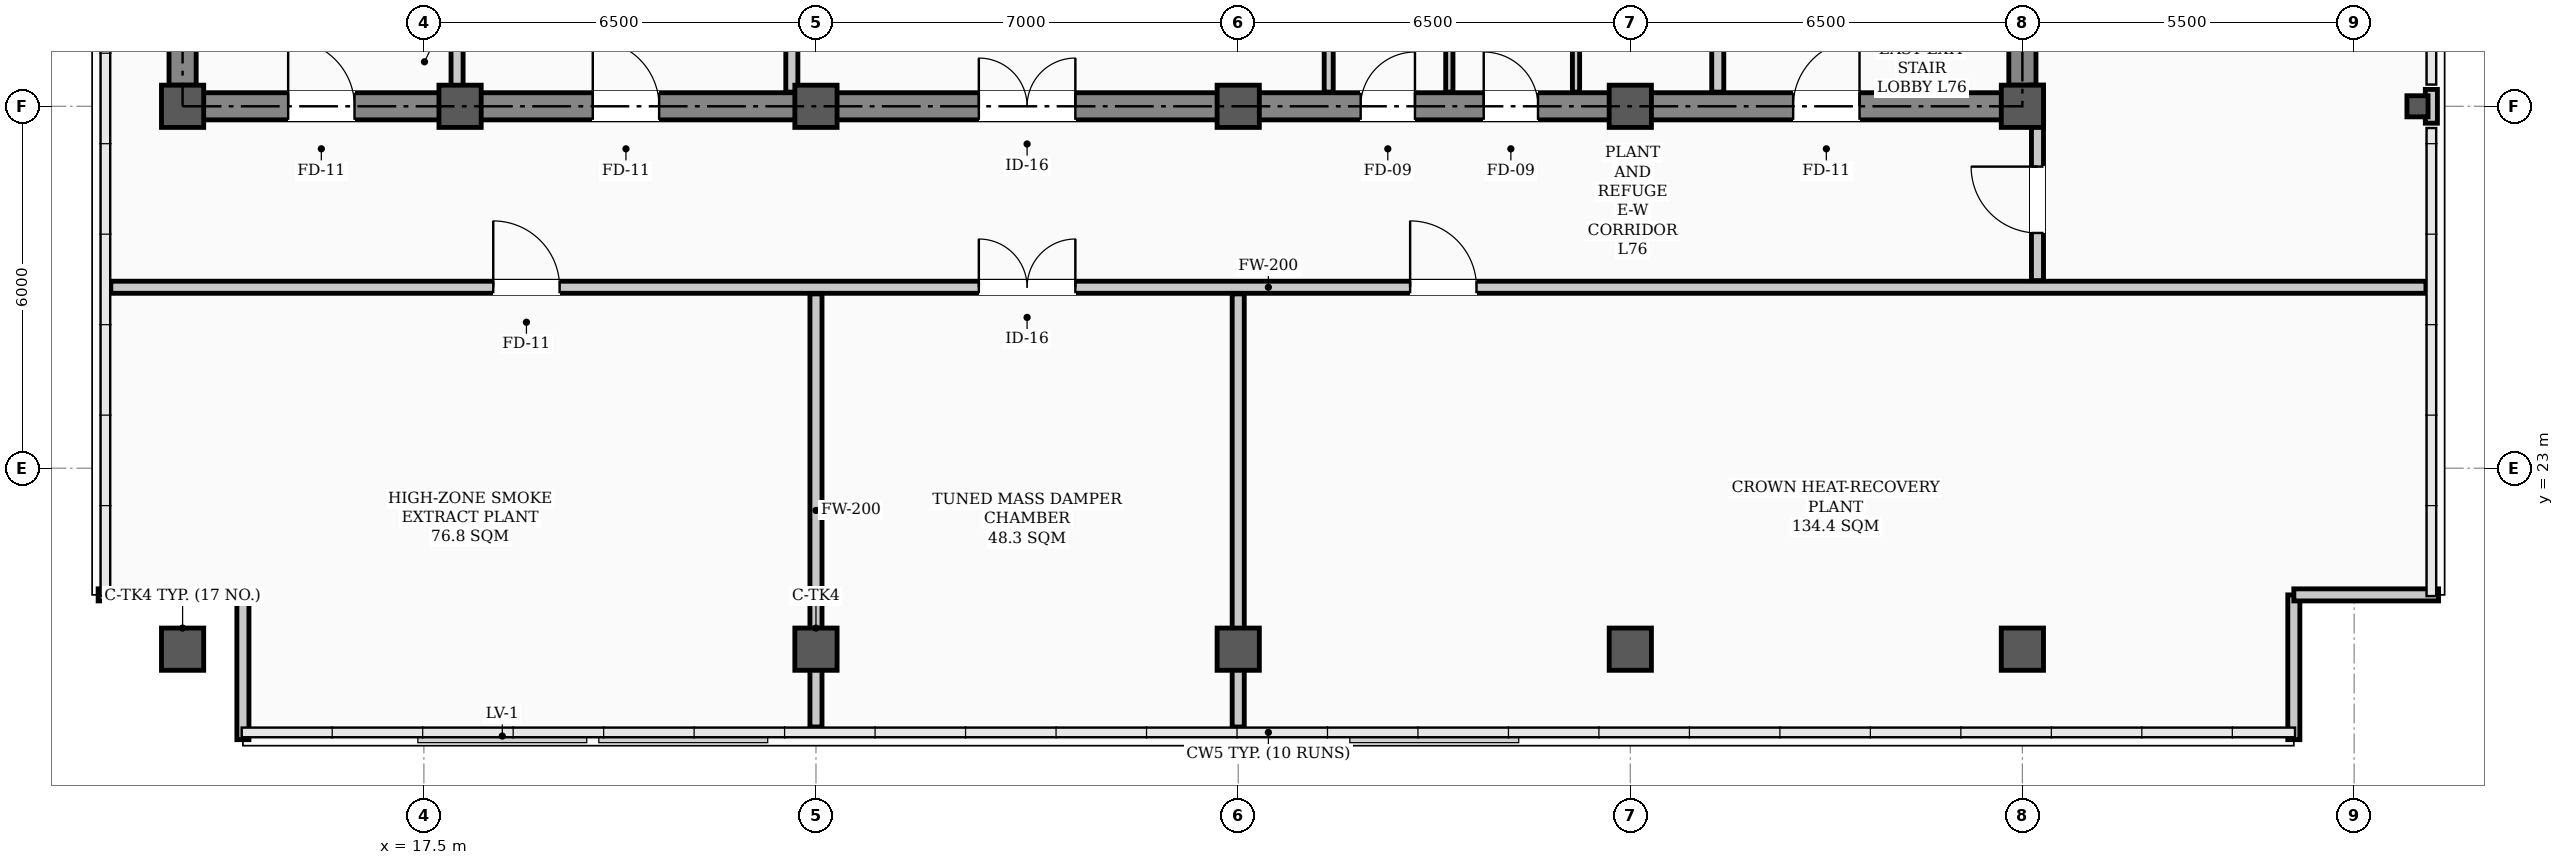
"""IFC4 building model, lengths in metres.
Left out: names, types, materials, properties, quantities, classifications, styles, units other than length and angle.
Written with IfcOpenShell. Run it as: python <this file> out.ifc"""

import sys

from ifc_helpers import new_model, si_unit, direction, frame, frame_2d, origin, origin_2d, place, context, subcontext, project, spatial, rectangle, hollow_rectangle, extrude, element, fill, save


model = new_model("IFC4")
c1 = context("Model", 3, precision=1e-05, world=origin(), true_north=direction((0.0, 1.0)))
c2 = subcontext(c1, "Body", "Model", "MODEL_VIEW")
j1 = project(units=[si_unit("LENGTHUNIT", "METRE"), si_unit("PLANEANGLEUNIT", "RADIAN")], contexts=[c1])
p1 = place(None, origin())
s1 = spatial("IfcSite", under=j1, at=p1, CompositionType="ELEMENT")
p2 = place(p1, origin())
s2 = spatial("IfcBuilding", under=s1, at=p2, CompositionType="ELEMENT")
p3 = place(p2, frame((0.0, 0.0, 306.0)))
s3 = spatial("IfcBuildingStorey", under=s2, at=p3, CompositionType="ELEMENT", Elevation=306.0)
for number, where, z_axis, x_axis in (
    (1, (13.5, 29.0, 0.0), (0.0, 0.0, 1.0), (1.0, 0.0, 0.0)),
    (2, (18.1, 29.0, 0.0), (0.0, 0.0, 1.0), (1.0, 0.0, 0.0)),
    (3, (24.0, 29.0, 0.0), (0.0, 0.0, 1.0), (1.0, 0.0, 0.0)),
    (4, (31.0, 29.0, 0.0), (0.0, 0.0, 1.0), (1.0, 0.0, 0.0)),
    (5, (37.5, 29.0, 0.0), (0.0, 0.0, 1.0), (1.0, 0.0, 0.0)),
    (6, (44.0, 29.0, 0.0), (0.0, 0.0, 1.0), (1.0, 0.0, 0.0)),
    (7, (13.5, 20.0, 0.0), (0.0, 0.0, 1.0), (1.0, 0.0, 0.0)),
    (8, (24.0, 20.0, 0.0), (0.0, 0.0, 1.0), (1.0, 0.0, 0.0)),
    (9, (31.0, 20.0, 0.0), (0.0, 0.0, 1.0), (1.0, 0.0, 0.0)),
    (10, (37.5, 20.0, 0.0), (0.0, 0.0, 1.0), (1.0, 0.0, 0.0)),
    (11, (44.0, 20.0, 0.0), (0.0, 0.0, 1.0), (1.0, 0.0, 0.0)),
):
    element("IfcColumn", number, at=place(p3, frame(where, z_axis=z_axis, x_axis=x_axis)), inside=s3, PredefinedType="COLUMN", context=c2, shape_type="SweptSolid", body=[
        extrude(hollow_rectangle(XDim=0.7, YDim=0.7, WallThickness=0.028, InnerFilletRadius=0.014, OuterFilletRadius=0.042, at=origin_2d()), origin(), (0.0, 0.0, 1.0), 6.6),
    ])
p4 = place(p3, frame((50.55, 29.0, 0.0), z_axis=(0.0, 0.0, 1.0), x_axis=(1.0, 0.0, 0.0)))
e12 = element("IfcColumn", 12, at=p4, inside=s3, PredefinedType="COLUMN", context=c2, shape_type="SweptSolid", body=[
    extrude(hollow_rectangle(XDim=0.35, YDim=0.35, WallThickness=0.016, InnerFilletRadius=0.016, OuterFilletRadius=0.032, at=origin_2d()), origin(), (0.0, 0.0, 1.0), 6.6),
])
p5 = place(p3, frame((50.78, 28.72, 0.0), z_axis=(0.0, 0.0, 1.0), x_axis=(0.0, 1.0, 0.0)))
e13 = element("IfcWall", 13, at=p5, inside=s3, PredefinedType="PARAPET", context=c2, shape_type="SweptSolid", body=[
    extrude(rectangle(XDim=0.56, YDim=0.2, at=frame_2d((0.28, 0.0))), origin(), (0.0, 0.0, 1.0), 1.2),
])
for number, where, z_axis, x_axis in (
    (14, (12.1, 20.9, 0.0), (0.0, 0.0, 1.0), (1.0, 0.0, 0.0)),
    (15, (14.5, 20.9, 0.0), (0.0, 0.0, 1.0), (0.0, -1.0, 0.0)),
    (16, (48.5, 18.5, 0.0), (0.0, 0.0, 1.0), (0.0, 1.0, 0.0)),
    (17, (48.5, 20.9, 0.0), (0.0, 0.0, 1.0), (1.0, 0.0, 0.0)),
):
    element("IfcWall", number, at=place(p3, frame(where, z_axis=z_axis, x_axis=x_axis)), inside=s3, PredefinedType="PARAPET", context=c2, shape_type="SweptSolid", body=[
        extrude(rectangle(XDim=2.4, YDim=0.2, at=frame_2d((1.2, 0.0))), origin(), (0.0, 0.0, 1.0), 1.2),
    ])
p6 = place(p3, frame((13.5, 29.0, 0.0), z_axis=(0.0, 0.0, 1.0), x_axis=(1.0, 0.0, 0.0)))
e18 = element("IfcWall", 18, at=p6, inside=s3, PredefinedType="SHEAR", context=c2, shape_type="SweptSolid", body=[
    extrude(rectangle(XDim=30.5, YDim=0.45, at=frame_2d((15.25, 0.0))), origin(), (0.0, 0.0, 1.0), 6.34),
])
p7 = place(p6, frame((1.75, 0.0, 0.0)))
e19 = element("IfcOpeningElement", 19, at=p7, cuts=e18, PredefinedType="OPENING", context=c2, shape_type="SweptSolid", body=[
    extrude(rectangle(XDim=1.1, YDim=2.08, at=frame_2d((0.55, 1.04))), frame((0.0, 0.235, 0.0), z_axis=(0.0, -1.0, 0.0), x_axis=(1.0, 0.0, 0.0)), (0.0, 0.0, 1.0), 0.47),
])
p8 = place(p6, frame((26.7, 0.0, 0.0)))
e20 = element("IfcOpeningElement", 20, at=p8, cuts=e18, PredefinedType="OPENING", context=c2, shape_type="SweptSolid", body=[
    extrude(rectangle(XDim=1.1, YDim=2.08, at=frame_2d((0.55, 1.04))), frame((0.0, 0.235, 0.0), z_axis=(0.0, -1.0, 0.0), x_axis=(1.0, 0.0, 0.0)), (0.0, 0.0, 1.0), 0.47),
])
p9 = place(p6, frame((6.8, 0.0, 0.0)))
e21 = element("IfcOpeningElement", 21, at=p9, cuts=e18, PredefinedType="OPENING", context=c2, shape_type="SweptSolid", body=[
    extrude(rectangle(XDim=1.1, YDim=2.08, at=frame_2d((0.55, 1.04))), frame((0.0, 0.235, 0.0), z_axis=(0.0, -1.0, 0.0), x_axis=(1.0, 0.0, 0.0)), (0.0, 0.0, 1.0), 0.47),
])
p10 = place(p6, frame((13.2, 0.0, 0.0)))
e22 = element("IfcOpeningElement", 22, at=p10, cuts=e18, PredefinedType="OPENING", context=c2, shape_type="SweptSolid", body=[
    extrude(rectangle(XDim=1.6, YDim=2.08, at=frame_2d((0.8, 1.04))), frame((0.0, 0.235, 0.0), z_axis=(0.0, -1.0, 0.0), x_axis=(1.0, 0.0, 0.0)), (0.0, 0.0, 1.0), 0.47),
])
p11 = place(p6, frame((19.53, 0.0, 0.0)))
e23 = element("IfcOpeningElement", 23, at=p11, cuts=e18, PredefinedType="OPENING", context=c2, shape_type="SweptSolid", body=[
    extrude(rectangle(XDim=0.9, YDim=2.08, at=frame_2d((0.45, 1.04))), frame((0.0, 0.235, 0.0), z_axis=(0.0, -1.0, 0.0), x_axis=(1.0, 0.0, 0.0)), (0.0, 0.0, 1.0), 0.47),
])
p12 = place(p6, frame((21.57, 0.0, 0.0)))
e24 = element("IfcOpeningElement", 24, at=p12, cuts=e18, PredefinedType="OPENING", context=c2, shape_type="SweptSolid", body=[
    extrude(rectangle(XDim=0.9, YDim=2.08, at=frame_2d((0.45, 1.04))), frame((0.0, 0.235, 0.0), z_axis=(0.0, -1.0, 0.0), x_axis=(1.0, 0.0, 0.0)), (0.0, 0.0, 1.0), 0.47),
])
for number, where, z_axis, x_axis in (
    (25, (13.5, 29.35, 0.0), (0.0, 0.0, 1.0), (0.0, 1.0, 0.0)),
    (26, (44.0, 29.35, 0.0), (0.0, 0.0, 1.0), (0.0, 1.0, 0.0)),
):
    element("IfcWall", number, at=place(p3, frame(where, z_axis=z_axis, x_axis=x_axis)), inside=s3, PredefinedType="SHEAR", context=c2, shape_type="SweptSolid", body=[
        extrude(rectangle(XDim=8.6, YDim=0.45, at=frame_2d((4.3, 0.0))), origin(), (0.0, 0.0, 1.0), 6.34),
    ])
p13 = place(p3, frame((12.31, 26.0, 0.0), z_axis=(0.0, 0.0, 1.0), x_axis=(1.0, 0.0, 0.0)))
e27 = element("IfcWall", 27, at=p13, inside=s3, PredefinedType="STANDARD", context=c2, shape_type="SweptSolid", body=[
    extrude(rectangle(XDim=38.38, YDim=0.2, at=frame_2d((19.19, 0.0))), origin(), (0.0, 0.0, 1.0), 2.43),
])
p14 = place(p13, frame((6.34, 0.0, 0.0)))
e28 = element("IfcOpeningElement", 28, at=p14, cuts=e27, PredefinedType="OPENING", context=c2, shape_type="SweptSolid", body=[
    extrude(rectangle(XDim=1.1, YDim=2.08, at=frame_2d((0.55, 1.04))), frame((0.0, 0.11, 0.0), z_axis=(0.0, -1.0, 0.0), x_axis=(1.0, 0.0, 0.0)), (0.0, 0.0, 1.0), 0.22),
])
p15 = place(p13, frame((14.39, 0.0, 0.0)))
e29 = element("IfcOpeningElement", 29, at=p15, cuts=e27, PredefinedType="OPENING", context=c2, shape_type="SweptSolid", body=[
    extrude(rectangle(XDim=1.6, YDim=2.08, at=frame_2d((0.8, 1.04))), frame((0.0, 0.11, 0.0), z_axis=(0.0, -1.0, 0.0), x_axis=(1.0, 0.0, 0.0)), (0.0, 0.0, 1.0), 0.22),
])
p16 = place(p13, frame((21.54, 0.0, 0.0)))
e30 = element("IfcOpeningElement", 30, at=p16, cuts=e27, PredefinedType="OPENING", context=c2, shape_type="SweptSolid", body=[
    extrude(rectangle(XDim=1.1, YDim=2.08, at=frame_2d((0.55, 1.04))), frame((0.0, 0.11, 0.0), z_axis=(0.0, -1.0, 0.0), x_axis=(1.0, 0.0, 0.0)), (0.0, 0.0, 1.0), 0.22),
])
p17 = place(p3, frame((18.05, 29.235, 0.0), z_axis=(0.0, 0.0, 1.0), x_axis=(0.0, 1.0, 0.0)))
e31 = element("IfcWall", 31, at=p17, inside=s3, PredefinedType="STANDARD", context=c2, shape_type="SweptSolid", body=[
    extrude(rectangle(XDim=1.065, YDim=0.2, at=frame_2d((0.532, 0.0))), origin(), (0.0, 0.0, 1.0), 6.34),
])
p18 = place(p3, frame((38.95, 29.235, 0.0), z_axis=(0.0, 0.0, 1.0), x_axis=(0.0, 1.0, 0.0)))
e32 = element("IfcWall", 32, at=p18, inside=s3, PredefinedType="STANDARD", context=c2, shape_type="SweptSolid", body=[
    extrude(rectangle(XDim=1.065, YDim=0.2, at=frame_2d((0.532, 0.0))), origin(), (0.0, 0.0, 1.0), 6.02),
])
p19 = place(p3, frame((23.6, 29.235, 0.0), z_axis=(0.0, 0.0, 1.0), x_axis=(0.0, 1.0, 0.0)))
e33 = element("IfcWall", 33, at=p19, inside=s3, PredefinedType="STANDARD", context=c2, shape_type="SweptSolid", body=[
    extrude(rectangle(XDim=5.465, YDim=0.2, at=frame_2d((2.732, 0.0))), origin(), (0.0, 0.0, 1.0), 2.43),
])
p20 = place(p3, frame((32.5, 29.235, 0.0), z_axis=(0.0, 0.0, 1.0), x_axis=(0.0, 1.0, 0.0)))
e34 = element("IfcWall", 34, at=p20, inside=s3, PredefinedType="PARTITIONING", context=c2, shape_type="SweptSolid", body=[
    extrude(rectangle(XDim=2.53, YDim=0.15, at=frame_2d((1.265, 0.0))), origin(), (0.0, 0.0, 1.0), 6.02),
])
for number, where, z_axis, x_axis in (
    (35, (36.6, 29.235, 0.0), (0.0, 0.0, 1.0), (0.0, 1.0, 0.0)),
    (36, (34.5, 29.235, 0.0), (0.0, 0.0, 1.0), (0.0, 1.0, 0.0)),
):
    element("IfcWall", number, at=place(p3, frame(where, z_axis=z_axis, x_axis=x_axis)), inside=s3, PredefinedType="PARTITIONING", context=c2, shape_type="SweptSolid", body=[
        extrude(rectangle(XDim=2.53, YDim=0.12, at=frame_2d((1.265, 0.0))), origin(), (0.0, 0.0, 1.0), 6.02),
    ])
p21 = place(p3, frame((44.25, 26.11, 0.0), z_axis=(0.0, 0.0, 1.0), x_axis=(0.0, 1.0, 0.0)))
e37 = element("IfcWall", 37, at=p21, inside=s3, PredefinedType="STANDARD", context=c2, shape_type="SweptSolid", body=[
    extrude(rectangle(XDim=3.24, YDim=0.2, at=frame_2d((1.62, 0.0))), origin(), (0.0, 0.0, 1.0), 5.72),
])
p22 = place(p21, frame((0.79, 0.0, 0.0)))
e38 = element("IfcOpeningElement", 38, at=p22, cuts=e37, PredefinedType="OPENING", context=c2, shape_type="SweptSolid", body=[
    extrude(rectangle(XDim=1.1, YDim=2.08, at=frame_2d((0.55, 1.04))), frame((0.0, 0.11, 0.0), z_axis=(0.0, -1.0, 0.0), x_axis=(1.0, 0.0, 0.0)), (0.0, 0.0, 1.0), 0.22),
])
for number, where, z_axis, x_axis in (
    (39, (24.0, 18.71, 0.0), (0.0, 0.0, 1.0), (0.0, 1.0, 0.0)),
    (40, (31.0, 18.71, 0.0), (0.0, 0.0, 1.0), (0.0, 1.0, 0.0)),
):
    element("IfcWall", number, at=place(p3, frame(where, z_axis=z_axis, x_axis=x_axis)), inside=s3, PredefinedType="STANDARD", context=c2, shape_type="SweptSolid", body=[
        extrude(rectangle(XDim=7.18, YDim=0.2, at=frame_2d((3.59, 0.0))), origin(), (0.0, 0.0, 1.0), 2.43),
    ])
p23 = place(p7, origin())
e41 = element("IfcDoor", 41, at=p23, inside=s3, OperationType="SINGLE_SWING_LEFT", PredefinedType="DOOR", context=c2, shape_type="SweptSolid", body=[
    extrude(rectangle(XDim=1.1, YDim=2.08, at=frame_2d((0.55, 1.04))), frame((0.0, 0.025, 0.0), z_axis=(0.0, -1.0, 0.0), x_axis=(1.0, 0.0, 0.0)), (0.0, 0.0, 1.0), 0.05),
])
fill(e19, e41)
p24 = place(p8, origin())
e42 = element("IfcDoor", 42, at=p24, inside=s3, OperationType="SINGLE_SWING_RIGHT", PredefinedType="DOOR", context=c2, shape_type="SweptSolid", body=[
    extrude(rectangle(XDim=1.1, YDim=2.08, at=frame_2d((0.55, 1.04))), frame((0.0, 0.025, 0.0), z_axis=(0.0, -1.0, 0.0), x_axis=(1.0, 0.0, 0.0)), (0.0, 0.0, 1.0), 0.05),
])
fill(e20, e42)
p25 = place(p9, origin())
e43 = element("IfcDoor", 43, at=p25, inside=s3, OperationType="SINGLE_SWING_LEFT", PredefinedType="DOOR", context=c2, shape_type="SweptSolid", body=[
    extrude(rectangle(XDim=1.1, YDim=2.08, at=frame_2d((0.55, 1.04))), frame((0.0, 0.025, 0.0), z_axis=(0.0, -1.0, 0.0), x_axis=(1.0, 0.0, 0.0)), (0.0, 0.0, 1.0), 0.05),
])
fill(e21, e43)
p26 = place(p10, origin())
e44 = element("IfcDoor", 44, at=p26, inside=s3, OperationType="DOUBLE_DOOR_SINGLE_SWING", PredefinedType="DOOR", context=c2, shape_type="SweptSolid", body=[
    extrude(rectangle(XDim=1.6, YDim=2.08, at=frame_2d((0.8, 1.04))), frame((0.0, 0.025, 0.0), z_axis=(0.0, -1.0, 0.0), x_axis=(1.0, 0.0, 0.0)), (0.0, 0.0, 1.0), 0.05),
])
fill(e22, e44)
p27 = place(p11, origin())
e45 = element("IfcDoor", 45, at=p27, inside=s3, OperationType="SINGLE_SWING_RIGHT", PredefinedType="DOOR", context=c2, shape_type="SweptSolid", body=[
    extrude(rectangle(XDim=0.9, YDim=2.08, at=frame_2d((0.45, 1.04))), frame((0.0, 0.025, 0.0), z_axis=(0.0, -1.0, 0.0), x_axis=(1.0, 0.0, 0.0)), (0.0, 0.0, 1.0), 0.05),
])
fill(e23, e45)
p28 = place(p12, origin())
e46 = element("IfcDoor", 46, at=p28, inside=s3, OperationType="SINGLE_SWING_LEFT", PredefinedType="DOOR", context=c2, shape_type="SweptSolid", body=[
    extrude(rectangle(XDim=0.9, YDim=2.08, at=frame_2d((0.45, 1.04))), frame((0.0, 0.025, 0.0), z_axis=(0.0, -1.0, 0.0), x_axis=(1.0, 0.0, 0.0)), (0.0, 0.0, 1.0), 0.05),
])
fill(e24, e46)
p29 = place(p22, origin())
e47 = element("IfcDoor", 47, at=p29, inside=s3, OperationType="SINGLE_SWING_RIGHT", PredefinedType="DOOR", context=c2, shape_type="SweptSolid", body=[
    extrude(rectangle(XDim=1.1, YDim=2.08, at=frame_2d((0.55, 1.04))), frame((0.0, 0.025, 0.0), z_axis=(0.0, -1.0, 0.0), x_axis=(1.0, 0.0, 0.0)), (0.0, 0.0, 1.0), 0.05),
])
fill(e38, e47)
p30 = place(p14, origin())
e48 = element("IfcDoor", 48, at=p30, inside=s3, OperationType="SINGLE_SWING_LEFT", PredefinedType="DOOR", context=c2, shape_type="SweptSolid", body=[
    extrude(rectangle(XDim=1.1, YDim=2.08, at=frame_2d((0.55, 1.04))), frame((0.0, 0.025, 0.0), z_axis=(0.0, -1.0, 0.0), x_axis=(1.0, 0.0, 0.0)), (0.0, 0.0, 1.0), 0.05),
])
fill(e28, e48)
p31 = place(p15, origin())
e49 = element("IfcDoor", 49, at=p31, inside=s3, OperationType="DOUBLE_DOOR_SINGLE_SWING", PredefinedType="DOOR", context=c2, shape_type="SweptSolid", body=[
    extrude(rectangle(XDim=1.6, YDim=2.08, at=frame_2d((0.8, 1.04))), frame((0.0, 0.025, 0.0), z_axis=(0.0, -1.0, 0.0), x_axis=(1.0, 0.0, 0.0)), (0.0, 0.0, 1.0), 0.05),
])
fill(e29, e49)
p32 = place(p16, origin())
e50 = element("IfcDoor", 50, at=p32, inside=s3, OperationType="SINGLE_SWING_LEFT", PredefinedType="DOOR", context=c2, shape_type="SweptSolid", body=[
    extrude(rectangle(XDim=1.1, YDim=2.08, at=frame_2d((0.55, 1.04))), frame((0.0, 0.025, 0.0), z_axis=(0.0, -1.0, 0.0), x_axis=(1.0, 0.0, 0.0)), (0.0, 0.0, 1.0), 0.05),
])
fill(e30, e50)
save(model, sys.argv[1])
